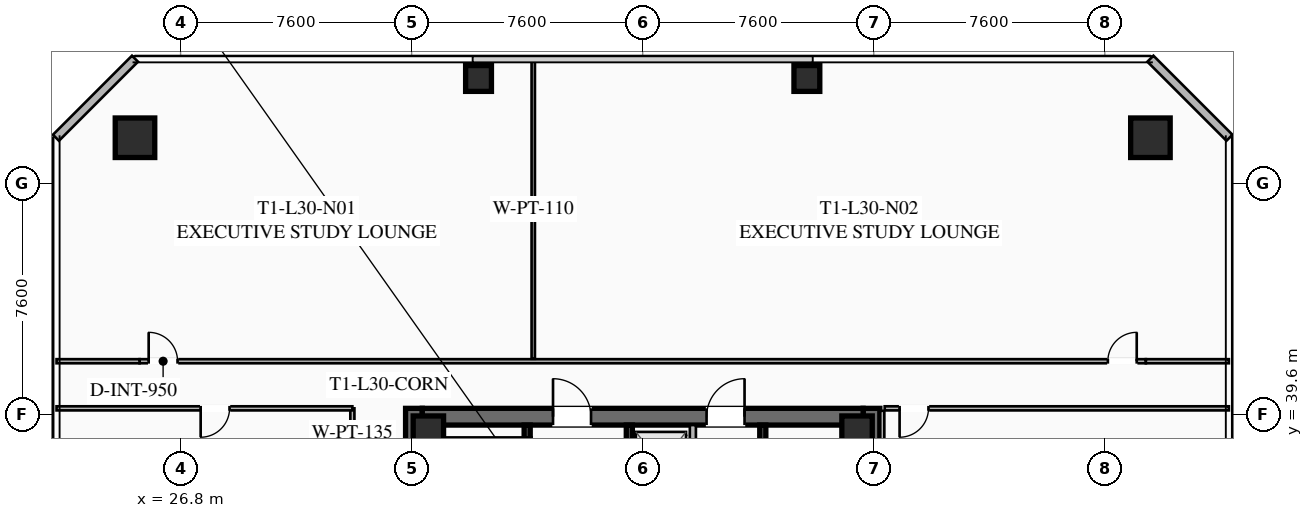
"""IFC4 building model, lengths in metres.
Left out: names, types, materials, properties, quantities, classifications, styles, units other than length and angle.
Written with IfcOpenShell. Run it as: python <this file> out.ifc"""

import sys

from ifc_helpers import new_model, si_unit, direction, frame, frame_2d, origin, origin_2d, place, context, subcontext, project, spatial, rectangle, hollow_rectangle, extrude, element, fill, save


model = new_model("IFC4")
c1 = context("Model", 3, precision=1e-05, world=origin(), true_north=direction((0.0, 1.0)))
c2 = subcontext(c1, "Body", "Model", "MODEL_VIEW")
j1 = project(units=[si_unit("LENGTHUNIT", "METRE"), si_unit("PLANEANGLEUNIT", "RADIAN")], contexts=[c1])
p1 = place(None, origin())
s1 = spatial("IfcSite", under=j1, at=p1, CompositionType="ELEMENT")
p2 = place(p1, origin())
s2 = spatial("IfcBuilding", under=s1, at=p2, CompositionType="ELEMENT")
p3 = place(p2, frame((0.0, 0.0, 114.4)))
s3 = spatial("IfcBuildingStorey", under=s2, at=p3, CompositionType="ELEMENT", Elevation=114.4)
for number, where, z_axis, x_axis in (
    (1, (34.475, 24.2, 0.0), (0.0, 0.0, 1.0), (0.0, 1.0, 0.0)),
    (2, (49.525, 39.8, 0.0), (0.0, 0.0, 1.0), (0.0, -1.0, 0.0)),
):
    element("IfcWall", number, at=place(p3, frame(where, z_axis=z_axis, x_axis=x_axis)), inside=s3, PredefinedType="SHEAR", context=c2, shape_type="SweptSolid", body=[
        extrude(rectangle(XDim=15.6, YDim=0.55, at=frame_2d((7.8, 0.0))), origin(), (0.0, 0.0, 1.0), 3.55),
    ])
p4 = place(p3, frame((34.75, 39.525, 0.0), z_axis=(0.0, 0.0, 1.0), x_axis=(1.0, 0.0, 0.0)))
e3 = element("IfcWall", 3, at=p4, inside=s3, PredefinedType="SHEAR", context=c2, shape_type="SweptSolid", body=[
    extrude(rectangle(XDim=14.5, YDim=0.55, at=frame_2d((7.25, 0.0))), origin(), (0.0, 0.0, 1.0), 3.55),
])
p5 = place(p4, frame((4.3, 0.0, 0.0)))
e4 = element("IfcOpeningElement", 4, at=p5, cuts=e3, PredefinedType="OPENING", context=c2, shape_type="SweptSolid", body=[
    extrude(rectangle(XDim=1.25, YDim=2.25, at=frame_2d((0.625, 1.125))), frame((0.0, 0.285, 0.0), z_axis=(0.0, -1.0, 0.0), x_axis=(1.0, 0.0, 0.0)), (0.0, 0.0, 1.0), 0.57),
])
p6 = place(p4, frame((9.35, 0.0, 0.0)))
e5 = element("IfcOpeningElement", 5, at=p6, cuts=e3, PredefinedType="OPENING", context=c2, shape_type="SweptSolid", body=[
    extrude(rectangle(XDim=1.25, YDim=2.25, at=frame_2d((0.625, 1.125))), frame((0.0, 0.285, 0.0), z_axis=(0.0, -1.0, 0.0), x_axis=(1.0, 0.0, 0.0)), (0.0, 0.0, 1.0), 0.57),
])
for number, where, z_axis, x_axis in (
    (6, (49.05, 39.05, 0.0), (0.0, 0.0, 1.0), (1.0, 0.0, 0.0)),
    (7, (34.95, 39.05, 0.0), (0.0, 0.0, 1.0), (1.0, 0.0, 0.0)),
):
    element("IfcColumn", number, at=place(p3, frame(where, z_axis=z_axis, x_axis=x_axis)), inside=s3, PredefinedType="COLUMN", context=c2, shape_type="SweptSolid", body=[
        extrude(hollow_rectangle(XDim=1.0, YDim=1.0, WallThickness=0.04, at=origin_2d()), origin(), (0.0, 0.0, 1.0), 3.37),
    ])
for number, where, z_axis, x_axis in (
    (8, (58.7, 48.7, 0.0), (0.0, 0.0, 1.0), (1.0, 0.0, 0.0)),
    (9, (25.3, 48.7, 0.0), (0.0, 0.0, 1.0), (1.0, 0.0, 0.0)),
):
    element("IfcColumn", number, at=place(p3, frame(where, z_axis=z_axis, x_axis=x_axis)), inside=s3, PredefinedType="COLUMN", context=c2, shape_type="SweptSolid", body=[
        extrude(hollow_rectangle(XDim=1.3, YDim=1.3, WallThickness=0.05, at=origin_2d()), origin(), (0.0, 0.0, 1.0), 3.37),
    ])
for number, where, z_axis, x_axis in (
    (10, (47.4, 50.65, 0.0), (0.0, 0.0, 1.0), (1.0, 0.0, 0.0)),
    (11, (36.6, 50.65, 0.0), (0.0, 0.0, 1.0), (1.0, 0.0, 0.0)),
):
    element("IfcColumn", number, at=place(p3, frame(where, z_axis=z_axis, x_axis=x_axis)), inside=s3, PredefinedType="COLUMN", context=c2, shape_type="SweptSolid", body=[
        extrude(hollow_rectangle(XDim=0.85, YDim=0.85, WallThickness=0.035, at=origin_2d()), origin(), (0.0, 0.0, 1.0), 3.37),
    ])
for number, where, z_axis, x_axis in (
    (12, (22.7, 48.7, 0.0), (0.0, 0.0, 1.0), (0.707, 0.707, 0.0)),
    (13, (58.7, 51.3, 0.0), (0.0, 0.0, 1.0), (0.707, -0.707, 0.0)),
):
    element("IfcWall", number, at=place(p3, frame(where, z_axis=z_axis, x_axis=x_axis)), inside=s3, PredefinedType="SOLIDWALL", context=c2, shape_type="SweptSolid", body=[
        extrude(rectangle(XDim=3.677, YDim=0.28, at=frame_2d((1.838, 0.0))), origin(), (0.0, 0.0, 1.0), 3.37),
    ])
p7 = place(p3, frame((38.2, 31.2, 0.0), z_axis=(0.0, 0.0, 1.0), x_axis=(0.0, 1.0, 0.0)))
e14 = element("IfcWall", 14, at=p7, inside=s3, PredefinedType="SHEAR", context=c2, shape_type="SweptSolid", body=[
    extrude(rectangle(XDim=8.05, YDim=0.2, at=frame_2d((4.025, 0.0))), origin(), (0.0, 0.0, 1.0), 3.37),
])
p8 = place(p7, frame((0.45, 0.0, 0.0)))
e15 = element("IfcOpeningElement", 15, at=p8, cuts=e14, PredefinedType="OPENING", context=c2, shape_type="SweptSolid", body=[
    extrude(rectangle(XDim=1.15, YDim=2.2, at=frame_2d((0.575, 1.1))), frame((0.0, 0.11, 0.0), z_axis=(0.0, -1.0, 0.0), x_axis=(1.0, 0.0, 0.0)), (0.0, 0.0, 1.0), 0.22),
])
p9 = place(p3, frame((41.56, 24.75, 0.0), z_axis=(0.0, 0.0, 1.0), x_axis=(0.0, 1.0, 0.0)))
e16 = element("IfcWall", 16, at=p9, inside=s3, PredefinedType="SHEAR", context=c2, shape_type="SweptSolid", body=[
    extrude(rectangle(XDim=14.5, YDim=0.2, at=frame_2d((7.25, 0.0))), origin(), (0.0, 0.0, 1.0), 3.37),
])
p10 = place(p3, frame((45.95, 39.25, 0.0), z_axis=(0.0, 0.0, 1.0), x_axis=(0.0, -1.0, 0.0)))
e17 = element("IfcWall", 17, at=p10, inside=s3, PredefinedType="SHEAR", context=c2, shape_type="SweptSolid", body=[
    extrude(rectangle(XDim=6.45, YDim=0.2, at=frame_2d((3.225, 0.0))), origin(), (0.0, 0.0, 1.0), 3.37),
])
p11 = place(p3, frame((43.65, 32.35, 0.0), z_axis=(0.0, 0.0, 1.0), x_axis=(0.0, 1.0, 0.0)))
e18 = element("IfcWall", 18, at=p11, inside=s3, PredefinedType="SOLIDWALL", context=c2, shape_type="SweptSolid", body=[
    extrude(rectangle(XDim=6.9, YDim=0.2, at=frame_2d((3.45, 0.0))), origin(), (0.0, 0.0, 1.0), 3.37),
])
p12 = place(p11, frame((0.575, 0.0, 0.0)))
e19 = element("IfcOpeningElement", 19, at=p12, cuts=e18, PredefinedType="OPENING", context=c2, shape_type="SweptSolid", body=[
    extrude(rectangle(XDim=1.1, YDim=2.2, at=frame_2d((0.55, 1.1))), frame((0.0, 0.11, 0.0), z_axis=(0.0, -1.0, 0.0), x_axis=(1.0, 0.0, 0.0)), (0.0, 0.0, 1.0), 0.22),
])
p13 = place(p11, frame((2.825, 0.0, 0.0)))
e20 = element("IfcOpeningElement", 20, at=p13, cuts=e18, PredefinedType="OPENING", context=c2, shape_type="SweptSolid", body=[
    extrude(rectangle(XDim=1.1, YDim=2.2, at=frame_2d((0.55, 1.1))), frame((0.0, 0.11, 0.0), z_axis=(0.0, -1.0, 0.0), x_axis=(1.0, 0.0, 0.0)), (0.0, 0.0, 1.0), 0.22),
])
p14 = place(p11, frame((5.075, 0.0, 0.0)))
e21 = element("IfcOpeningElement", 21, at=p14, cuts=e18, PredefinedType="OPENING", context=c2, shape_type="SweptSolid", body=[
    extrude(rectangle(XDim=1.1, YDim=2.2, at=frame_2d((0.55, 1.1))), frame((0.0, 0.11, 0.0), z_axis=(0.0, -1.0, 0.0), x_axis=(1.0, 0.0, 0.0)), (0.0, 0.0, 1.0), 0.22),
])
p15 = place(p3, frame((32.45, 35.4, 0.0), z_axis=(0.0, 0.0, 1.0), x_axis=(0.0, 1.0, 0.0)))
e22 = element("IfcWall", 22, at=p15, inside=s3, PredefinedType="PARTITIONING", context=c2, shape_type="SweptSolid", body=[
    extrude(rectangle(XDim=4.4, YDim=0.135, at=frame_2d((2.2, 0.0))), origin(), (0.0, 0.0, 1.0), 2.723),
])
p16 = place(p3, frame((25.45, 41.35, 0.0), z_axis=(0.0, 0.0, 1.0), x_axis=(1.0, 0.0, 0.0)))
e23 = element("IfcWall", 23, at=p16, inside=s3, PredefinedType="PARTITIONING", context=c2, shape_type="SweptSolid", body=[
    extrude(rectangle(XDim=33.1, YDim=0.135, at=frame_2d((16.55, 0.0))), origin(), (0.0, 0.0, 1.0), 2.723),
])
p17 = place(p16, frame((0.3, 0.0, 0.0)))
e24 = element("IfcOpeningElement", 24, at=p17, cuts=e23, PredefinedType="OPENING", context=c2, shape_type="SweptSolid", body=[
    extrude(rectangle(XDim=0.95, YDim=2.05, at=frame_2d((0.475, 1.025))), frame((0.0, 0.077, 0.0), z_axis=(0.0, -1.0, 0.0), x_axis=(1.0, 0.0, 0.0)), (0.0, 0.0, 1.0), 0.155),
])
p18 = place(p16, frame((31.85, 0.0, 0.0)))
e25 = element("IfcOpeningElement", 25, at=p18, cuts=e23, PredefinedType="OPENING", context=c2, shape_type="SweptSolid", body=[
    extrude(rectangle(XDim=0.95, YDim=2.05, at=frame_2d((0.475, 1.025))), frame((0.0, 0.077, 0.0), z_axis=(0.0, -1.0, 0.0), x_axis=(1.0, 0.0, 0.0)), (0.0, 0.0, 1.0), 0.155),
])
for number, where, z_axis, x_axis in (
    (26, (22.72, 41.35, 0.0), (0.0, 0.0, 1.0), (1.0, 0.0, 0.0)),
    (27, (58.55, 41.35, 0.0), (0.0, 0.0, 1.0), (1.0, 0.0, 0.0)),
):
    element("IfcWall", number, at=place(p3, frame(where, z_axis=z_axis, x_axis=x_axis)), inside=s3, PredefinedType="PARTITIONING", context=c2, shape_type="SweptSolid", body=[
        extrude(rectangle(XDim=2.73, YDim=0.135, at=frame_2d((1.365, 0.0))), origin(), (0.0, 0.0, 1.0), 2.723),
    ])
p19 = place(p3, frame((38.4, 41.43, 0.0), z_axis=(0.0, 0.0, 1.0), x_axis=(0.0, 1.0, 0.0)))
e28 = element("IfcWall", 28, at=p19, inside=s3, PredefinedType="PARTITIONING", context=c2, shape_type="SweptSolid", body=[
    extrude(rectangle(XDim=9.85, YDim=0.11, at=frame_2d((4.925, 0.0))), origin(), (0.0, 0.0, 1.0), 2.723),
])
p20 = place(p3, frame((49.88, 39.72, 0.0), z_axis=(0.0, 0.0, 1.0), x_axis=(0.0, -1.0, 0.0)))
e29 = element("IfcWall", 29, at=p20, inside=s3, PredefinedType="PARTITIONING", context=c2, shape_type="SweptSolid", body=[
    extrude(rectangle(XDim=15.44, YDim=0.135, at=frame_2d((7.72, 0.0))), origin(), (0.0, 0.0, 1.0), 2.723),
])
p21 = place(p3, frame((61.28, 39.8, 0.0), z_axis=(0.0, 0.0, 1.0), x_axis=(-1.0, 0.0, 0.0)))
e30 = element("IfcWall", 30, at=p21, inside=s3, PredefinedType="PARTITIONING", context=c2, shape_type="SweptSolid", body=[
    extrude(rectangle(XDim=11.32, YDim=0.135, at=frame_2d((5.66, 0.0))), origin(), (0.0, 0.0, 1.0), 2.723),
])
p22 = place(p21, frame((9.88, 0.0, 0.0)))
e31 = element("IfcOpeningElement", 31, at=p22, cuts=e30, PredefinedType="OPENING", context=c2, shape_type="SweptSolid", body=[
    extrude(rectangle(XDim=0.95, YDim=2.05, at=frame_2d((0.475, 1.025))), frame((0.0, 0.077, 0.0), z_axis=(0.0, -1.0, 0.0), x_axis=(1.0, 0.0, 0.0)), (0.0, 0.0, 1.0), 0.155),
])
p23 = place(p3, frame((32.45, 39.8, 0.0), z_axis=(0.0, 0.0, 1.0), x_axis=(-1.0, 0.0, 0.0)))
e32 = element("IfcWall", 32, at=p23, inside=s3, PredefinedType="PARTITIONING", context=c2, shape_type="SweptSolid", body=[
    extrude(rectangle(XDim=9.73, YDim=0.135, at=frame_2d((4.865, 0.0))), origin(), (0.0, 0.0, 1.0), 2.723),
])
p24 = place(p23, frame((4.04, 0.0, 0.0)))
e33 = element("IfcOpeningElement", 33, at=p24, cuts=e32, PredefinedType="OPENING", context=c2, shape_type="SweptSolid", body=[
    extrude(rectangle(XDim=0.95, YDim=2.05, at=frame_2d((0.475, 1.025))), frame((0.0, 0.077, 0.0), z_axis=(0.0, -1.0, 0.0), x_axis=(1.0, 0.0, 0.0)), (0.0, 0.0, 1.0), 0.155),
])
p25 = place(p5, origin())
e34 = element("IfcDoor", 34, at=p25, inside=s3, OperationType="SINGLE_SWING_LEFT", PredefinedType="DOOR", context=c2, shape_type="SweptSolid", body=[
    extrude(rectangle(XDim=1.25, YDim=2.25, at=frame_2d((0.625, 1.125))), frame((0.0, 0.025, 0.0), z_axis=(0.0, -1.0, 0.0), x_axis=(1.0, 0.0, 0.0)), (0.0, 0.0, 1.0), 0.05),
])
fill(e4, e34)
p26 = place(p6, origin())
e35 = element("IfcDoor", 35, at=p26, inside=s3, OperationType="SINGLE_SWING_RIGHT", PredefinedType="DOOR", context=c2, shape_type="SweptSolid", body=[
    extrude(rectangle(XDim=1.25, YDim=2.25, at=frame_2d((0.625, 1.125))), frame((0.0, 0.025, 0.0), z_axis=(0.0, -1.0, 0.0), x_axis=(1.0, 0.0, 0.0)), (0.0, 0.0, 1.0), 0.05),
])
fill(e5, e35)
p27 = place(p17, origin())
e36 = element("IfcDoor", 36, at=p27, inside=s3, OperationType="SINGLE_SWING_LEFT", PredefinedType="DOOR", context=c2, shape_type="SweptSolid", body=[
    extrude(rectangle(XDim=0.95, YDim=2.05, at=frame_2d((0.475, 1.025))), frame((0.0, 0.025, 0.0), z_axis=(0.0, -1.0, 0.0), x_axis=(1.0, 0.0, 0.0)), (0.0, 0.0, 1.0), 0.05),
])
fill(e24, e36)
p28 = place(p18, origin())
e37 = element("IfcDoor", 37, at=p28, inside=s3, OperationType="SINGLE_SWING_RIGHT", PredefinedType="DOOR", context=c2, shape_type="SweptSolid", body=[
    extrude(rectangle(XDim=0.95, YDim=2.05, at=frame_2d((0.475, 1.025))), frame((0.0, 0.025, 0.0), z_axis=(0.0, -1.0, 0.0), x_axis=(1.0, 0.0, 0.0)), (0.0, 0.0, 1.0), 0.05),
])
fill(e25, e37)
p29 = place(p22, origin())
e38 = element("IfcDoor", 38, at=p29, inside=s3, OperationType="SINGLE_SWING_RIGHT", PredefinedType="DOOR", context=c2, shape_type="SweptSolid", body=[
    extrude(rectangle(XDim=0.95, YDim=2.05, at=frame_2d((0.475, 1.025))), frame((0.0, 0.025, 0.0), z_axis=(0.0, -1.0, 0.0), x_axis=(1.0, 0.0, 0.0)), (0.0, 0.0, 1.0), 0.05),
])
fill(e31, e38)
p30 = place(p24, origin())
e39 = element("IfcDoor", 39, at=p30, inside=s3, OperationType="SINGLE_SWING_RIGHT", PredefinedType="DOOR", context=c2, shape_type="SweptSolid", body=[
    extrude(rectangle(XDim=0.95, YDim=2.05, at=frame_2d((0.475, 1.025))), frame((0.0, 0.025, 0.0), z_axis=(0.0, -1.0, 0.0), x_axis=(1.0, 0.0, 0.0)), (0.0, 0.0, 1.0), 0.05),
])
fill(e33, e39)
save(model, sys.argv[1])
